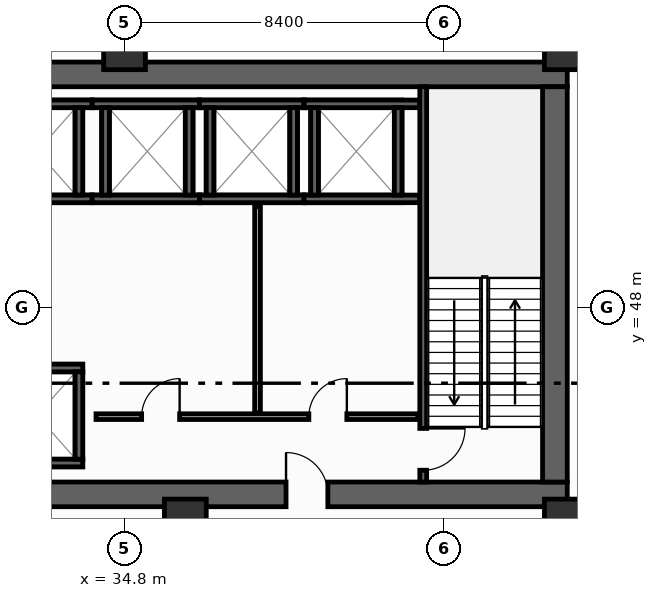
"""IFC4 building model, lengths in metres.
Left out: names, types, materials, properties, quantities, classifications, styles, units other than length and angle.
Written with IfcOpenShell. Run it as: python <this file> out.ifc"""

import sys

from ifc_helpers import new_model, si_unit, direction, frame, frame_2d, origin, origin_2d, place, context, subcontext, project, spatial, rectangle, extrude, element, fill, save


model = new_model("IFC4")
c1 = context("Model", 3, precision=1e-05, world=origin(), true_north=direction((0.0, 1.0)))
c2 = subcontext(c1, "Body", "Model", "MODEL_VIEW")
j1 = project(units=[si_unit("LENGTHUNIT", "METRE"), si_unit("PLANEANGLEUNIT", "RADIAN")], contexts=[c1])
p1 = place(None, origin())
s1 = spatial("IfcSite", under=j1, at=p1, CompositionType="ELEMENT")
p2 = place(p1, origin())
s2 = spatial("IfcBuilding", under=s1, at=p2, CompositionType="ELEMENT")
p3 = place(p2, frame((0.0, 0.0, -10.8)))
s3 = spatial("IfcBuildingStorey", under=s2, at=p3, CompositionType="ELEMENT", Elevation=-10.8)
p4 = place(p3, frame((13.45, 43.075, 0.0), z_axis=(0.0, 0.0, 1.0), x_axis=(1.0, 0.0, 0.0)))
e1 = element("IfcWall", 1, at=p4, inside=s3, PredefinedType="SHEAR", context=c2, shape_type="SweptSolid", body=[
    extrude(rectangle(XDim=33.0, YDim=0.65, at=frame_2d((16.5, 0.0))), origin(), (0.0, 0.0, 1.0), 5.05),
])
p5 = place(p4, frame((5.4, 0.0, 0.0)))
e2 = element("IfcOpeningElement", 2, at=p5, cuts=e1, PredefinedType="OPENING", context=c2, shape_type="SweptSolid", body=[
    extrude(rectangle(XDim=1.1, YDim=2.15, at=frame_2d((0.55, 1.075))), frame((0.0, 0.335, 0.0), z_axis=(0.0, -1.0, 0.0), x_axis=(1.0, 0.0, 0.0)), (0.0, 0.0, 1.0), 0.67),
])
p6 = place(p4, frame((25.6, 0.0, 0.0)))
e3 = element("IfcOpeningElement", 3, at=p6, cuts=e1, PredefinedType="OPENING", context=c2, shape_type="SweptSolid", body=[
    extrude(rectangle(XDim=1.1, YDim=2.15, at=frame_2d((0.55, 1.075))), frame((0.0, 0.335, 0.0), z_axis=(0.0, -1.0, 0.0), x_axis=(1.0, 0.0, 0.0)), (0.0, 0.0, 1.0), 0.67),
])
p7 = place(p3, frame((13.45, 54.125, 0.0), z_axis=(0.0, 0.0, 1.0), x_axis=(1.0, 0.0, 0.0)))
e4 = element("IfcWall", 4, at=p7, inside=s3, PredefinedType="SHEAR", context=c2, shape_type="SweptSolid", body=[
    extrude(rectangle(XDim=33.0, YDim=0.65, at=frame_2d((16.5, 0.0))), origin(), (0.0, 0.0, 1.0), 5.05),
])
p8 = place(p3, frame((46.125, 43.4, 0.0), z_axis=(0.0, 0.0, 1.0), x_axis=(0.0, 1.0, 0.0)))
e5 = element("IfcWall", 5, at=p8, inside=s3, PredefinedType="SHEAR", context=c2, shape_type="SweptSolid", body=[
    extrude(rectangle(XDim=10.4, YDim=0.65, at=frame_2d((5.2, 0.0))), origin(), (0.0, 0.0, 1.0), 5.05),
])
for number, where, z_axis, x_axis in (
    (6, (34.8, 54.8, 0.0), (0.0, 0.0, 1.0), (1.0, 0.0, 0.0)),
    (7, (46.4, 54.8, 0.0), (0.0, 0.0, 1.0), (1.0, 0.0, 0.0)),
    (8, (36.4, 42.4, 0.0), (0.0, 0.0, 1.0), (1.0, 0.0, 0.0)),
    (9, (46.4, 42.4, 0.0), (0.0, 0.0, 1.0), (1.0, 0.0, 0.0)),
):
    element("IfcColumn", number, at=place(p3, frame(where, z_axis=z_axis, x_axis=x_axis)), inside=s3, PredefinedType="COLUMN", context=c2, shape_type="SweptSolid", body=[
        extrude(rectangle(XDim=1.1, YDim=1.1, at=origin_2d()), origin(), (0.0, 0.0, 1.0), 5.4),
    ])
for number, where, z_axis, x_axis in (
    (10, (31.125, 50.85, -1.48), (0.0, 0.0, 1.0), (1.0, 0.0, 0.0)),
    (11, (31.125, 53.35, -1.48), (0.0, 0.0, 1.0), (1.0, 0.0, 0.0)),
):
    element("IfcWall", number, at=place(p3, frame(where, z_axis=z_axis, x_axis=x_axis)), inside=s3, PredefinedType="SHEAR", context=c2, shape_type="SweptSolid", body=[
        extrude(rectangle(XDim=2.825, YDim=0.2, at=frame_2d((1.413, 0.0))), origin(), (0.0, 0.0, 1.0), 1.48),
    ])
p9 = place(p3, frame((33.6, 50.95, -1.48), z_axis=(0.0, 0.0, 1.0), x_axis=(0.0, 1.0, 0.0)))
e12 = element("IfcWall", 12, at=p9, inside=s3, PredefinedType="SHEAR", context=c2, shape_type="SweptSolid", body=[
    extrude(rectangle(XDim=2.3, YDim=0.2, at=frame_2d((1.15, 0.0))), origin(), (0.0, 0.0, 1.0), 1.48),
])
for number, where, z_axis, x_axis in (
    (13, (31.125, 50.85, 0.0), (0.0, 0.0, 1.0), (1.0, 0.0, 0.0)),
    (14, (31.125, 53.35, 0.0), (0.0, 0.0, 1.0), (1.0, 0.0, 0.0)),
):
    element("IfcWall", number, at=place(p3, frame(where, z_axis=z_axis, x_axis=x_axis)), inside=s3, PredefinedType="SHEAR", context=c2, shape_type="SweptSolid", body=[
        extrude(rectangle(XDim=2.825, YDim=0.2, at=frame_2d((1.413, 0.0))), origin(), (0.0, 0.0, 1.0), 5.05),
    ])
p10 = place(p3, frame((33.6, 50.95, 0.0), z_axis=(0.0, 0.0, 1.0), x_axis=(0.0, 1.0, 0.0)))
e15 = element("IfcWall", 15, at=p10, inside=s3, PredefinedType="SHEAR", context=c2, shape_type="SweptSolid", body=[
    extrude(rectangle(XDim=2.3, YDim=0.2, at=frame_2d((1.15, 0.0))), origin(), (0.0, 0.0, 1.0), 5.05),
])
for number, where, z_axis, x_axis in (
    (16, (31.125, 43.9, -1.48), (0.0, 0.0, 1.0), (1.0, 0.0, 0.0)),
    (17, (31.125, 46.4, -1.48), (0.0, 0.0, 1.0), (1.0, 0.0, 0.0)),
):
    element("IfcWall", number, at=place(p3, frame(where, z_axis=z_axis, x_axis=x_axis)), inside=s3, PredefinedType="SHEAR", context=c2, shape_type="SweptSolid", body=[
        extrude(rectangle(XDim=2.575, YDim=0.2, at=frame_2d((1.288, 0.0))), origin(), (0.0, 0.0, 1.0), 1.48),
    ])
p11 = place(p3, frame((33.6, 44.0, -1.48), z_axis=(0.0, 0.0, 1.0), x_axis=(0.0, 1.0, 0.0)))
e18 = element("IfcWall", 18, at=p11, inside=s3, PredefinedType="SHEAR", context=c2, shape_type="SweptSolid", body=[
    extrude(rectangle(XDim=2.3, YDim=0.2, at=frame_2d((1.15, 0.0))), origin(), (0.0, 0.0, 1.0), 1.48),
])
for number, where, z_axis, x_axis in (
    (19, (31.125, 43.9, 0.0), (0.0, 0.0, 1.0), (1.0, 0.0, 0.0)),
    (20, (31.125, 46.4, 0.0), (0.0, 0.0, 1.0), (1.0, 0.0, 0.0)),
):
    element("IfcWall", number, at=place(p3, frame(where, z_axis=z_axis, x_axis=x_axis)), inside=s3, PredefinedType="SHEAR", context=c2, shape_type="SweptSolid", body=[
        extrude(rectangle(XDim=2.575, YDim=0.2, at=frame_2d((1.288, 0.0))), origin(), (0.0, 0.0, 1.0), 5.05),
    ])
p12 = place(p3, frame((33.6, 44.0, 0.0), z_axis=(0.0, 0.0, 1.0), x_axis=(0.0, 1.0, 0.0)))
e21 = element("IfcWall", 21, at=p12, inside=s3, PredefinedType="SHEAR", context=c2, shape_type="SweptSolid", body=[
    extrude(rectangle(XDim=2.3, YDim=0.2, at=frame_2d((1.15, 0.0))), origin(), (0.0, 0.0, 1.0), 5.05),
])
for number, where, z_axis, x_axis in (
    (22, (33.95, 50.85, -1.48), (0.0, 0.0, 1.0), (1.0, 0.0, 0.0)),
    (23, (33.95, 53.35, -1.48), (0.0, 0.0, 1.0), (1.0, 0.0, 0.0)),
):
    element("IfcWall", number, at=place(p3, frame(where, z_axis=z_axis, x_axis=x_axis)), inside=s3, PredefinedType="SHEAR", context=c2, shape_type="SweptSolid", body=[
        extrude(rectangle(XDim=2.825, YDim=0.2, at=frame_2d((1.413, 0.0))), origin(), (0.0, 0.0, 1.0), 1.48),
    ])
for number, where, z_axis, x_axis in (
    (24, (34.3, 50.95, -1.48), (0.0, 0.0, 1.0), (0.0, 1.0, 0.0)),
    (25, (36.5, 50.95, -1.48), (0.0, 0.0, 1.0), (0.0, 1.0, 0.0)),
):
    element("IfcWall", number, at=place(p3, frame(where, z_axis=z_axis, x_axis=x_axis)), inside=s3, PredefinedType="SHEAR", context=c2, shape_type="SweptSolid", body=[
        extrude(rectangle(XDim=2.3, YDim=0.2, at=frame_2d((1.15, 0.0))), origin(), (0.0, 0.0, 1.0), 1.48),
    ])
for number, where, z_axis, x_axis in (
    (26, (33.95, 50.85, 0.0), (0.0, 0.0, 1.0), (1.0, 0.0, 0.0)),
    (27, (33.95, 53.35, 0.0), (0.0, 0.0, 1.0), (1.0, 0.0, 0.0)),
):
    element("IfcWall", number, at=place(p3, frame(where, z_axis=z_axis, x_axis=x_axis)), inside=s3, PredefinedType="SHEAR", context=c2, shape_type="SweptSolid", body=[
        extrude(rectangle(XDim=2.825, YDim=0.2, at=frame_2d((1.413, 0.0))), origin(), (0.0, 0.0, 1.0), 5.05),
    ])
for number, where, z_axis, x_axis in (
    (28, (34.3, 50.95, 0.0), (0.0, 0.0, 1.0), (0.0, 1.0, 0.0)),
    (29, (36.5, 50.95, 0.0), (0.0, 0.0, 1.0), (0.0, 1.0, 0.0)),
):
    element("IfcWall", number, at=place(p3, frame(where, z_axis=z_axis, x_axis=x_axis)), inside=s3, PredefinedType="SHEAR", context=c2, shape_type="SweptSolid", body=[
        extrude(rectangle(XDim=2.3, YDim=0.2, at=frame_2d((1.15, 0.0))), origin(), (0.0, 0.0, 1.0), 5.05),
    ])
for number, where, z_axis, x_axis in (
    (30, (36.775, 50.85, -1.48), (0.0, 0.0, 1.0), (1.0, 0.0, 0.0)),
    (31, (36.775, 53.35, -1.48), (0.0, 0.0, 1.0), (1.0, 0.0, 0.0)),
):
    element("IfcWall", number, at=place(p3, frame(where, z_axis=z_axis, x_axis=x_axis)), inside=s3, PredefinedType="SHEAR", context=c2, shape_type="SweptSolid", body=[
        extrude(rectangle(XDim=2.75, YDim=0.2, at=frame_2d((1.375, 0.0))), origin(), (0.0, 0.0, 1.0), 1.48),
    ])
for number, where, z_axis, x_axis in (
    (32, (37.05, 50.95, -1.48), (0.0, 0.0, 1.0), (0.0, 1.0, 0.0)),
    (33, (39.25, 50.95, -1.48), (0.0, 0.0, 1.0), (0.0, 1.0, 0.0)),
):
    element("IfcWall", number, at=place(p3, frame(where, z_axis=z_axis, x_axis=x_axis)), inside=s3, PredefinedType="SHEAR", context=c2, shape_type="SweptSolid", body=[
        extrude(rectangle(XDim=2.3, YDim=0.2, at=frame_2d((1.15, 0.0))), origin(), (0.0, 0.0, 1.0), 1.48),
    ])
for number, where, z_axis, x_axis in (
    (34, (36.775, 50.85, 0.0), (0.0, 0.0, 1.0), (1.0, 0.0, 0.0)),
    (35, (36.775, 53.35, 0.0), (0.0, 0.0, 1.0), (1.0, 0.0, 0.0)),
):
    element("IfcWall", number, at=place(p3, frame(where, z_axis=z_axis, x_axis=x_axis)), inside=s3, PredefinedType="SHEAR", context=c2, shape_type="SweptSolid", body=[
        extrude(rectangle(XDim=2.75, YDim=0.2, at=frame_2d((1.375, 0.0))), origin(), (0.0, 0.0, 1.0), 5.05),
    ])
for number, where, z_axis, x_axis in (
    (36, (37.05, 50.95, 0.0), (0.0, 0.0, 1.0), (0.0, 1.0, 0.0)),
    (37, (39.25, 50.95, 0.0), (0.0, 0.0, 1.0), (0.0, 1.0, 0.0)),
):
    element("IfcWall", number, at=place(p3, frame(where, z_axis=z_axis, x_axis=x_axis)), inside=s3, PredefinedType="SHEAR", context=c2, shape_type="SweptSolid", body=[
        extrude(rectangle(XDim=2.3, YDim=0.2, at=frame_2d((1.15, 0.0))), origin(), (0.0, 0.0, 1.0), 5.05),
    ])
for number, where, z_axis, x_axis in (
    (38, (39.525, 50.85, -1.48), (0.0, 0.0, 1.0), (1.0, 0.0, 0.0)),
    (39, (39.525, 53.35, -1.48), (0.0, 0.0, 1.0), (1.0, 0.0, 0.0)),
):
    element("IfcWall", number, at=place(p3, frame(where, z_axis=z_axis, x_axis=x_axis)), inside=s3, PredefinedType="SHEAR", context=c2, shape_type="SweptSolid", body=[
        extrude(rectangle(XDim=2.575, YDim=0.2, at=frame_2d((1.288, 0.0))), origin(), (0.0, 0.0, 1.0), 1.48),
    ])
for number, where, z_axis, x_axis in (
    (40, (39.8, 50.95, -1.48), (0.0, 0.0, 1.0), (0.0, 1.0, 0.0)),
    (41, (42.0, 50.95, -1.48), (0.0, 0.0, 1.0), (0.0, 1.0, 0.0)),
):
    element("IfcWall", number, at=place(p3, frame(where, z_axis=z_axis, x_axis=x_axis)), inside=s3, PredefinedType="SHEAR", context=c2, shape_type="SweptSolid", body=[
        extrude(rectangle(XDim=2.3, YDim=0.2, at=frame_2d((1.15, 0.0))), origin(), (0.0, 0.0, 1.0), 1.48),
    ])
for number, where, z_axis, x_axis in (
    (42, (39.525, 50.85, 0.0), (0.0, 0.0, 1.0), (1.0, 0.0, 0.0)),
    (43, (39.525, 53.35, 0.0), (0.0, 0.0, 1.0), (1.0, 0.0, 0.0)),
):
    element("IfcWall", number, at=place(p3, frame(where, z_axis=z_axis, x_axis=x_axis)), inside=s3, PredefinedType="SHEAR", context=c2, shape_type="SweptSolid", body=[
        extrude(rectangle(XDim=3.045, YDim=0.2, at=frame_2d((1.522, 0.0))), origin(), (0.0, 0.0, 1.0), 5.05),
    ])
for number, where, z_axis, x_axis in (
    (44, (39.8, 50.95, 0.0), (0.0, 0.0, 1.0), (0.0, 1.0, 0.0)),
    (45, (42.0, 50.95, 0.0), (0.0, 0.0, 1.0), (0.0, 1.0, 0.0)),
):
    element("IfcWall", number, at=place(p3, frame(where, z_axis=z_axis, x_axis=x_axis)), inside=s3, PredefinedType="SHEAR", context=c2, shape_type="SweptSolid", body=[
        extrude(rectangle(XDim=2.3, YDim=0.2, at=frame_2d((1.15, 0.0))), origin(), (0.0, 0.0, 1.0), 5.05),
    ])
p13 = place(p3, frame((42.66, 53.8, 0.0), z_axis=(0.0, 0.0, 1.0), x_axis=(0.0, -1.0, 0.0)))
e46 = element("IfcWall", 46, at=p13, inside=s3, PredefinedType="SHEAR", context=c2, shape_type="SweptSolid", body=[
    extrude(rectangle(XDim=10.4, YDim=0.18, at=frame_2d((5.2, 0.0))), origin(), (0.0, 0.0, 1.0), 5.05),
])
p14 = place(p13, frame((8.99, 0.0, 0.0)))
e47 = element("IfcOpeningElement", 47, at=p14, cuts=e46, PredefinedType="OPENING", context=c2, shape_type="SweptSolid", body=[
    extrude(rectangle(XDim=1.1, YDim=2.15, at=frame_2d((0.55, 1.075))), frame((0.0, 0.1, 0.0), z_axis=(0.0, -1.0, 0.0), x_axis=(1.0, 0.0, 0.0)), (0.0, 0.0, 1.0), 0.2),
])
p15 = place(p3, frame((34.05, 45.12, 0.0), z_axis=(0.0, 0.0, 1.0), x_axis=(1.0, 0.0, 0.0)))
e48 = element("IfcWall", 48, at=p15, inside=s3, PredefinedType="PARTITIONING", context=c2, shape_type="SweptSolid", body=[
    extrude(rectangle(XDim=8.47, YDim=0.15, at=frame_2d((4.235, 0.0))), origin(), (0.0, 0.0, 1.0), 5.05),
])
p16 = place(p15, frame((1.2, 0.0, 0.0)))
e49 = element("IfcOpeningElement", 49, at=p16, cuts=e48, PredefinedType="OPENING", context=c2, shape_type="SweptSolid", body=[
    extrude(rectangle(XDim=1.0, YDim=2.15, at=frame_2d((0.5, 1.075))), frame((0.0, 0.085, 0.0), z_axis=(0.0, -1.0, 0.0), x_axis=(1.0, 0.0, 0.0)), (0.0, 0.0, 1.0), 0.17),
])
p17 = place(p15, frame((5.6, 0.0, 0.0)))
e50 = element("IfcOpeningElement", 50, at=p17, cuts=e48, PredefinedType="OPENING", context=c2, shape_type="SweptSolid", body=[
    extrude(rectangle(XDim=1.0, YDim=2.15, at=frame_2d((0.5, 1.075))), frame((0.0, 0.085, 0.0), z_axis=(0.0, -1.0, 0.0), x_axis=(1.0, 0.0, 0.0)), (0.0, 0.0, 1.0), 0.17),
])
p18 = place(p3, frame((38.3, 45.22, 0.0), z_axis=(0.0, 0.0, 1.0), x_axis=(0.0, 1.0, 0.0)))
e51 = element("IfcWall", 51, at=p18, inside=s3, PredefinedType="PARTITIONING", context=c2, shape_type="SweptSolid", body=[
    extrude(rectangle(XDim=5.43, YDim=0.15, at=frame_2d((2.715, 0.0))), origin(), (0.0, 0.0, 1.0), 5.05),
])
p19 = place(p14, origin())
e52 = element("IfcDoor", 52, at=p19, inside=s3, OperationType="SINGLE_SWING_LEFT", PredefinedType="DOOR", context=c2, shape_type="SweptSolid", body=[
    extrude(rectangle(XDim=1.1, YDim=2.15, at=frame_2d((0.55, 1.075))), frame((0.0, 0.025, 0.0), z_axis=(0.0, -1.0, 0.0), x_axis=(1.0, 0.0, 0.0)), (0.0, 0.0, 1.0), 0.05),
])
fill(e47, e52)
p20 = place(p6, origin())
e53 = element("IfcDoor", 53, at=p20, inside=s3, OperationType="SINGLE_SWING_LEFT", PredefinedType="DOOR", context=c2, shape_type="SweptSolid", body=[
    extrude(rectangle(XDim=1.1, YDim=2.15, at=frame_2d((0.55, 1.075))), frame((0.0, 0.025, 0.0), z_axis=(0.0, -1.0, 0.0), x_axis=(1.0, 0.0, 0.0)), (0.0, 0.0, 1.0), 0.05),
])
fill(e3, e53)
p21 = place(p16, origin())
e54 = element("IfcDoor", 54, at=p21, inside=s3, OperationType="SINGLE_SWING_RIGHT", PredefinedType="DOOR", context=c2, shape_type="SweptSolid", body=[
    extrude(rectangle(XDim=1.0, YDim=2.15, at=frame_2d((0.5, 1.075))), frame((0.0, 0.025, 0.0), z_axis=(0.0, -1.0, 0.0), x_axis=(1.0, 0.0, 0.0)), (0.0, 0.0, 1.0), 0.05),
])
fill(e49, e54)
p22 = place(p17, origin())
e55 = element("IfcDoor", 55, at=p22, inside=s3, OperationType="SINGLE_SWING_RIGHT", PredefinedType="DOOR", context=c2, shape_type="SweptSolid", body=[
    extrude(rectangle(XDim=1.0, YDim=2.15, at=frame_2d((0.5, 1.075))), frame((0.0, 0.025, 0.0), z_axis=(0.0, -1.0, 0.0), x_axis=(1.0, 0.0, 0.0)), (0.0, 0.0, 1.0), 0.05),
])
fill(e50, e55)
save(model, sys.argv[1])
